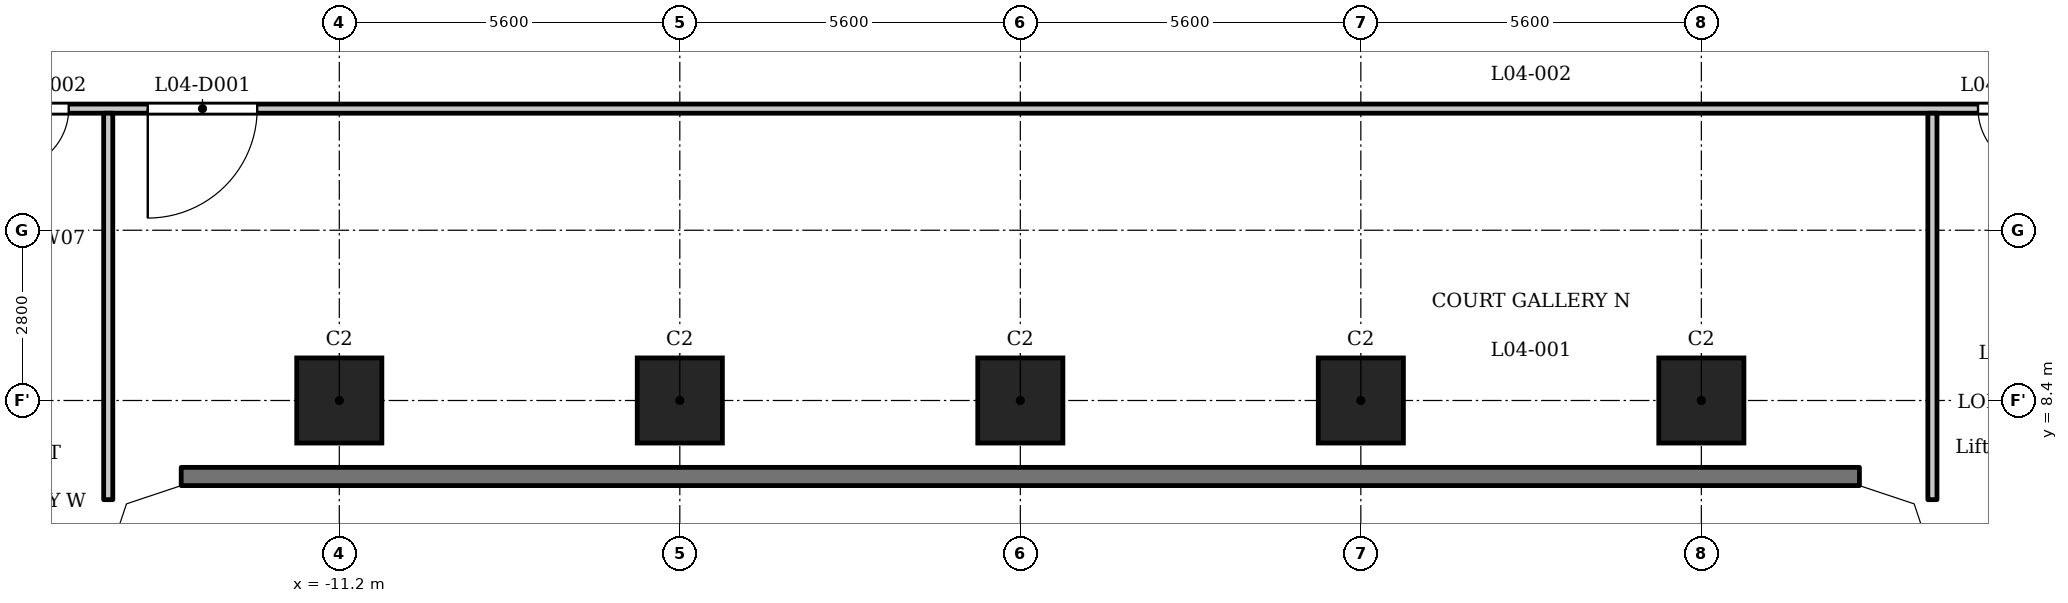
"""IFC4 building model, lengths in metres.
Left out: names, types, materials, properties, quantities, classifications, styles, units other than length and angle.
Written with IfcOpenShell. Run it as: python <this file> out.ifc"""

import sys

from ifc_helpers import new_model, si_unit, direction, frame, frame_2d, origin, origin_2d, place, context, subcontext, project, spatial, polyline, rectangle, outline, extrude, element, fill, save


model = new_model("IFC4")
c1 = context("Model", 3, precision=1e-05, world=origin(), true_north=direction((0.0, 1.0)))
c2 = subcontext(c1, "Body", "Model", "MODEL_VIEW")
j1 = project(units=[si_unit("LENGTHUNIT", "METRE"), si_unit("PLANEANGLEUNIT", "RADIAN")], contexts=[c1])
p1 = place(None, origin())
s1 = spatial("IfcSite", under=j1, at=p1, CompositionType="ELEMENT")
p2 = place(p1, origin())
s2 = spatial("IfcBuilding", under=s1, at=p2, CompositionType="ELEMENT")
p3 = place(p2, frame((0.0, 0.0, 20.9)))
s3 = spatial("IfcBuildingStorey", under=s2, at=p3, CompositionType="ELEMENT", Elevation=20.9)
for number, where, z_axis, x_axis in (
    (1, (-11.2, 8.4, 0.0), (0.0, 0.0, 1.0), (1.0, 0.0, 0.0)),
    (2, (-5.6, 8.4, 0.0), (0.0, 0.0, 1.0), (1.0, 0.0, 0.0)),
    (3, (0.0, 8.4, 0.0), (0.0, 0.0, 1.0), (1.0, 0.0, 0.0)),
    (4, (5.6, 8.4, 0.0), (0.0, 0.0, 1.0), (1.0, 0.0, 0.0)),
    (5, (11.2, 8.4, 0.0), (0.0, 0.0, 1.0), (1.0, 0.0, 0.0)),
):
    element("IfcColumn", number, at=place(p3, frame(where, z_axis=z_axis, x_axis=x_axis)), inside=s3, PredefinedType="COLUMN", context=c2, shape_type="SweptSolid", body=[
        extrude(rectangle(XDim=1.4, YDim=1.4, at=origin_2d()), origin(), (0.0, 0.0, 1.0), 4.8),
    ])
p4 = place(p3, frame((-13.8, 7.15, 0.0), z_axis=(0.0, 0.0, 1.0), x_axis=(1.0, 0.0, 0.0)))
e6 = element("IfcWall", 6, at=p4, inside=s3, PredefinedType="SOLIDWALL", context=c2, shape_type="SweptSolid", body=[
    extrude(rectangle(XDim=27.6, YDim=0.3, at=frame_2d((13.8, 0.0))), origin(), (0.0, 0.0, 1.0), 4.45),
])
p5 = place(p3, frame((-17.4, 13.2, 0.0), z_axis=(0.0, 0.0, 1.0), x_axis=(1.0, 0.0, 0.0)))
e7 = element("IfcWall", 7, at=p5, inside=s3, PredefinedType="PARTITIONING", context=c2, shape_type="SweptSolid", body=[
    extrude(rectangle(XDim=34.8, YDim=0.15, at=frame_2d((17.4, 0.0))), origin(), (0.0, 0.0, 1.0), 4.45),
])
p6 = place(p5, frame((3.05, 0.0, 0.0)))
e8 = element("IfcOpeningElement", 8, at=p6, cuts=e7, PredefinedType="OPENING", context=c2, shape_type="SweptSolid", body=[
    extrude(rectangle(XDim=1.8, YDim=2.1, at=frame_2d((0.9, 1.05))), frame((0.0, 0.085, 0.0), z_axis=(0.0, -1.0, 0.0), x_axis=(1.0, 0.0, 0.0)), (0.0, 0.0, 1.0), 0.17),
])
p7 = place(p5, frame((0.75, 0.0, 0.0)))
e9 = element("IfcOpeningElement", 9, at=p7, cuts=e7, PredefinedType="OPENING", context=c2, shape_type="SweptSolid", body=[
    extrude(rectangle(XDim=1.0, YDim=2.1, at=frame_2d((0.5, 1.05))), frame((0.0, 0.085, 0.0), z_axis=(0.0, -1.0, 0.0), x_axis=(1.0, 0.0, 0.0)), (0.0, 0.0, 1.0), 0.17),
])
p8 = place(p5, frame((33.15, 0.0, 0.0)))
e10 = element("IfcOpeningElement", 10, at=p8, cuts=e7, PredefinedType="OPENING", context=c2, shape_type="SweptSolid", body=[
    extrude(rectangle(XDim=1.0, YDim=2.1, at=frame_2d((0.5, 1.05))), frame((0.0, 0.085, 0.0), z_axis=(0.0, -1.0, 0.0), x_axis=(1.0, 0.0, 0.0)), (0.0, 0.0, 1.0), 0.17),
])
for number, where, z_axis, x_axis in (
    (11, (-15.0, 6.769, 0.0), (0.0, 0.0, 1.0), (0.0, 1.0, 0.0)),
    (12, (15.0, 6.769, 0.0), (0.0, 0.0, 1.0), (0.0, 1.0, 0.0)),
):
    element("IfcWall", number, at=place(p3, frame(where, z_axis=z_axis, x_axis=x_axis)), inside=s3, PredefinedType="PARTITIONING", context=c2, shape_type="SweptSolid", body=[
        extrude(rectangle(XDim=6.356, YDim=0.15, at=frame_2d((3.178, 0.0))), origin(), (0.0, 0.0, 1.0), 4.45),
    ])
p9 = place(p3, origin())
e13 = element("IfcWall", 13, at=p9, inside=s3, PredefinedType="SOLIDWALL", context=c2, shape_type="SweptSolid", body=[
    extrude(outline(polyline([(-13.849, 7.3), (-14.937, 6.937), (-15.3, 5.849), (-15.3, 5.8), (-15.0, 5.8), (-14.7, 6.7), (-13.8, 7.0), (-13.8, 7.3), (-13.849, 7.3)])), origin(), (0.0, 0.0, 1.0), 4.45),
])
e14 = element("IfcWall", 14, at=p9, inside=s3, PredefinedType="SOLIDWALL", context=c2, shape_type="SweptSolid", body=[
    extrude(outline(polyline([(14.937, 6.937), (13.849, 7.3), (13.8, 7.3), (13.8, 7.0), (14.7, 6.7), (15.0, 5.8), (15.3, 5.8), (15.3, 5.849), (14.937, 6.937)])), origin(), (0.0, 0.0, 1.0), 4.45),
])
p10 = place(p6, origin())
e15 = element("IfcDoor", 15, at=p10, inside=s3, OperationType="SINGLE_SWING_LEFT", PredefinedType="DOOR", context=c2, shape_type="SweptSolid", body=[
    extrude(rectangle(XDim=1.8, YDim=2.1, at=frame_2d((0.9, 1.05))), frame((0.0, 0.025, 0.0), z_axis=(0.0, -1.0, 0.0), x_axis=(1.0, 0.0, 0.0)), (0.0, 0.0, 1.0), 0.05),
])
fill(e8, e15)
p11 = place(p7, origin())
e16 = element("IfcDoor", 16, at=p11, inside=s3, OperationType="SINGLE_SWING_LEFT", PredefinedType="DOOR", context=c2, shape_type="SweptSolid", body=[
    extrude(rectangle(XDim=1.0, YDim=2.1, at=frame_2d((0.5, 1.05))), frame((0.0, 0.025, 0.0), z_axis=(0.0, -1.0, 0.0), x_axis=(1.0, 0.0, 0.0)), (0.0, 0.0, 1.0), 0.05),
])
fill(e9, e16)
p12 = place(p8, origin())
e17 = element("IfcDoor", 17, at=p12, inside=s3, OperationType="SINGLE_SWING_RIGHT", PredefinedType="DOOR", context=c2, shape_type="SweptSolid", body=[
    extrude(rectangle(XDim=1.0, YDim=2.1, at=frame_2d((0.5, 1.05))), frame((0.0, 0.025, 0.0), z_axis=(0.0, -1.0, 0.0), x_axis=(1.0, 0.0, 0.0)), (0.0, 0.0, 1.0), 0.05),
])
fill(e10, e17)
save(model, sys.argv[1])
